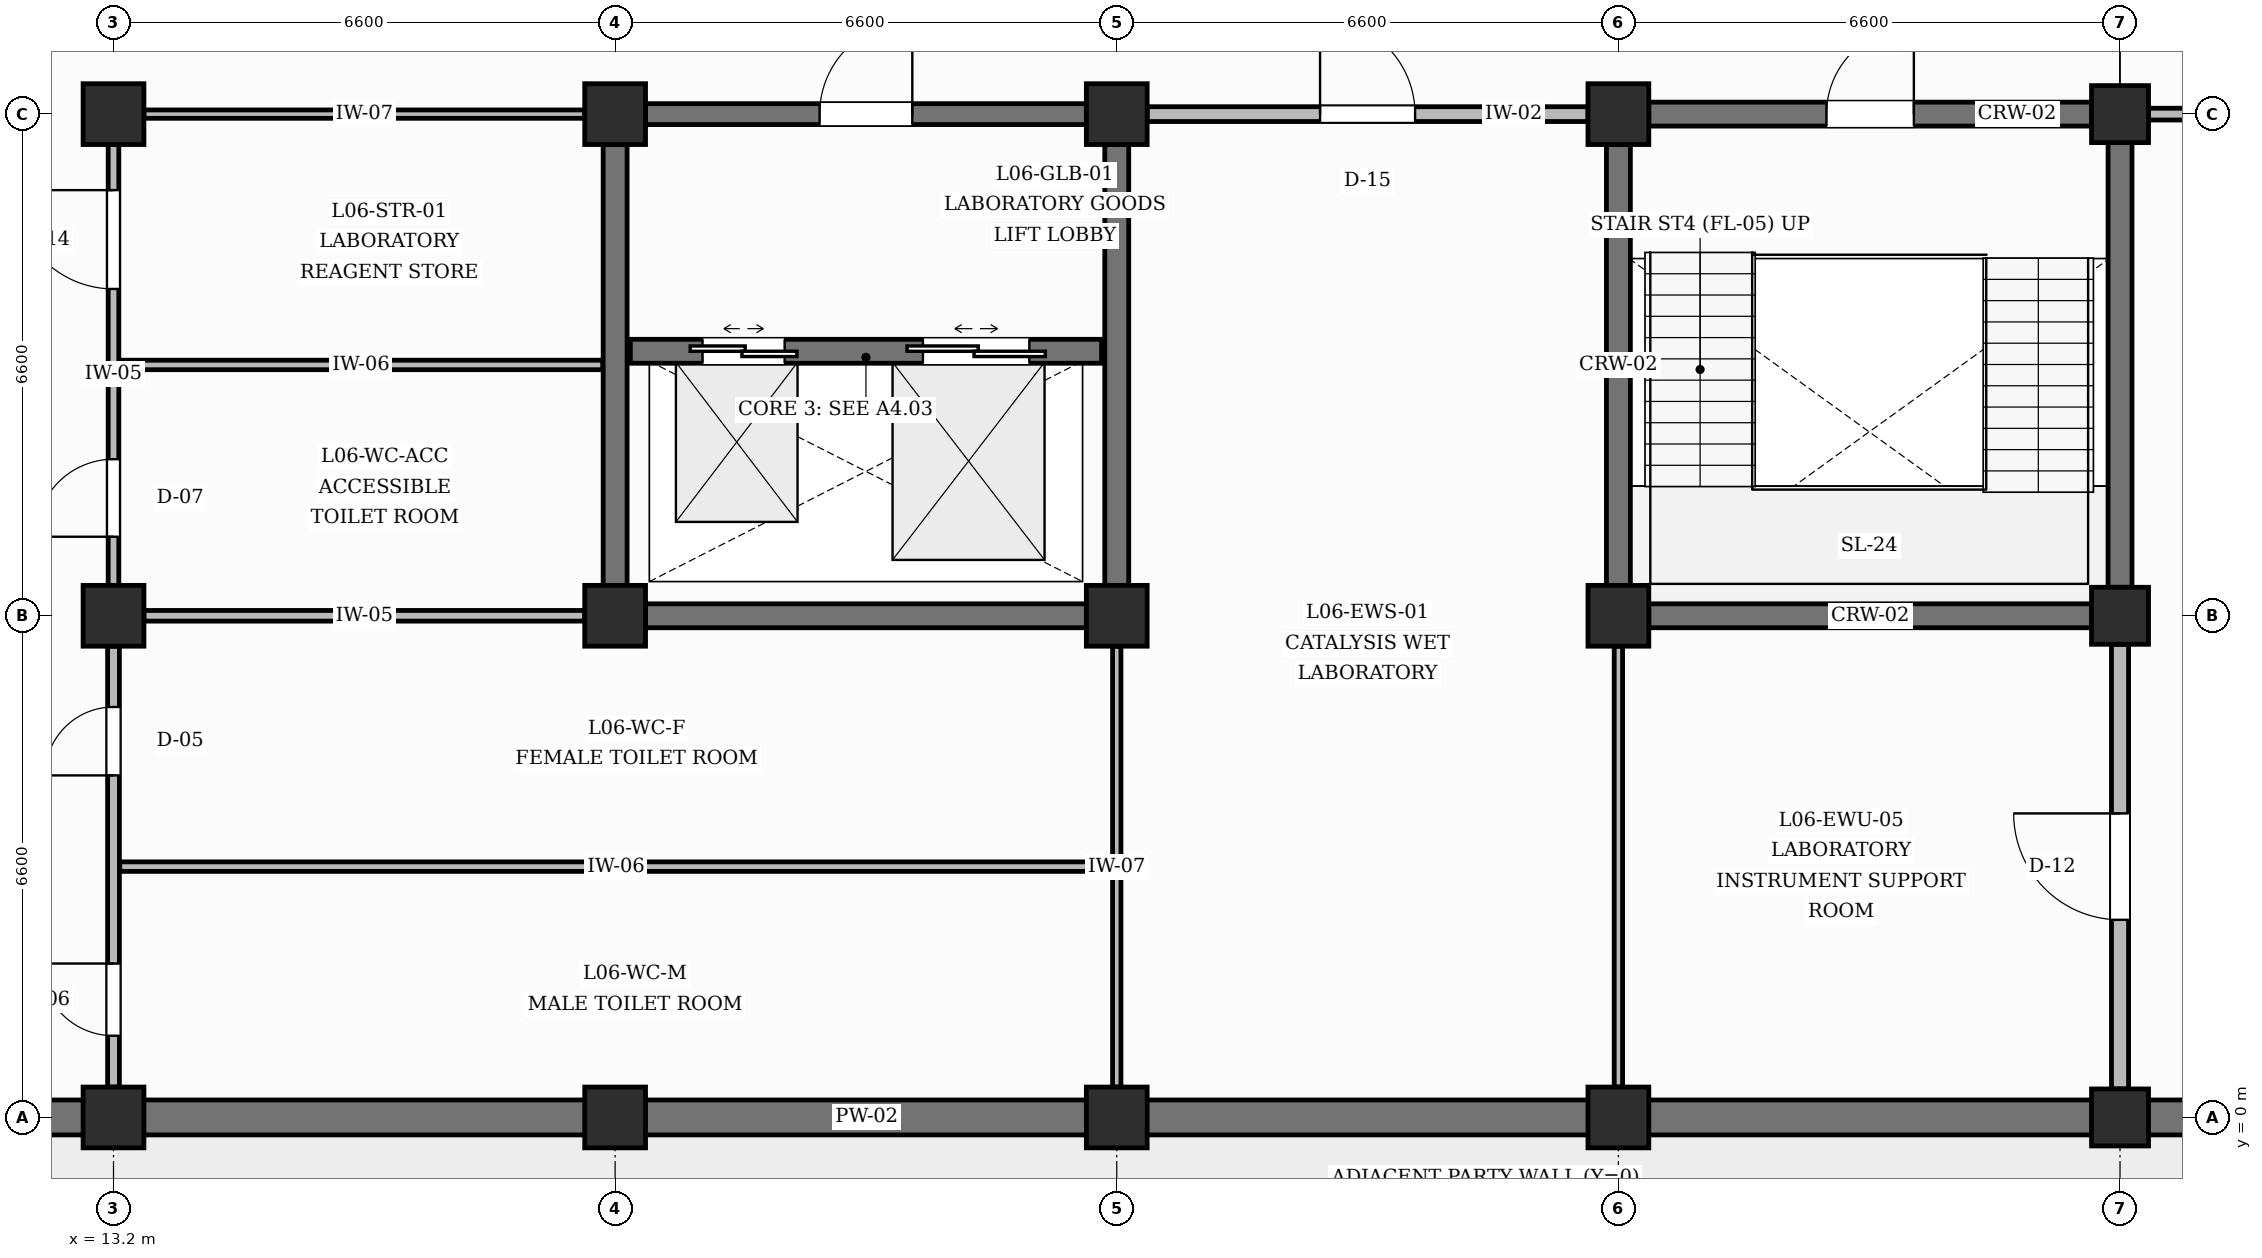
"""IFC4 building model, lengths in metres.
Left out: names, types, materials, properties, quantities, classifications, styles, units other than length and angle.
Written with IfcOpenShell. Run it as: python <this file> out.ifc"""

import sys

from ifc_helpers import new_model, si_unit, direction, frame, frame_2d, origin, origin_2d, place, context, subcontext, project, spatial, rectangle, extrude, element, fill, save


model = new_model("IFC4")
c1 = context("Model", 3, precision=1e-05, world=origin(), true_north=direction((0.0, 1.0)))
c2 = subcontext(c1, "Body", "Model", "MODEL_VIEW")
j1 = project(units=[si_unit("LENGTHUNIT", "METRE"), si_unit("PLANEANGLEUNIT", "RADIAN")], contexts=[c1])
p1 = place(None, origin())
s1 = spatial("IfcSite", under=j1, at=p1, CompositionType="ELEMENT")
p2 = place(p1, origin())
s2 = spatial("IfcBuilding", under=s1, at=p2, CompositionType="ELEMENT")
p3 = place(p2, frame((0.0, 0.0, 27.0)))
s3 = spatial("IfcBuildingStorey", under=s2, at=p3, CompositionType="ELEMENT", Elevation=27.0)
for number, where, z_axis, x_axis in (
    (1, (13.2, 0.0, 0.0), (0.0, 0.0, 1.0), (1.0, 0.0, 0.0)),
    (2, (13.2, 6.6, 0.0), (0.0, 0.0, 1.0), (1.0, 0.0, 0.0)),
    (3, (13.2, 13.2, 0.0), (0.0, 0.0, 1.0), (1.0, 0.0, 0.0)),
    (4, (19.8, 0.0, 0.0), (0.0, 0.0, 1.0), (1.0, 0.0, 0.0)),
    (5, (19.8, 6.6, 0.0), (0.0, 0.0, 1.0), (1.0, 0.0, 0.0)),
    (6, (19.8, 13.2, 0.0), (0.0, 0.0, 1.0), (1.0, 0.0, 0.0)),
    (7, (26.4, 0.0, 0.0), (0.0, 0.0, 1.0), (1.0, 0.0, 0.0)),
    (8, (26.4, 6.6, 0.0), (0.0, 0.0, 1.0), (1.0, 0.0, 0.0)),
    (9, (26.4, 13.2, 0.0), (0.0, 0.0, 1.0), (1.0, 0.0, 0.0)),
    (10, (33.0, 0.0, 0.0), (0.0, 0.0, 1.0), (1.0, 0.0, 0.0)),
    (11, (33.0, 6.6, 0.0), (0.0, 0.0, 1.0), (1.0, 0.0, 0.0)),
    (12, (33.0, 13.2, 0.0), (0.0, 0.0, 1.0), (1.0, 0.0, 0.0)),
):
    element("IfcColumn", number, at=place(p3, frame(where, z_axis=z_axis, x_axis=x_axis)), inside=s3, PredefinedType="COLUMN", context=c2, shape_type="SweptSolid", body=[
        extrude(rectangle(XDim=0.8, YDim=0.8, at=origin_2d()), origin(), (0.0, 0.0, 1.0), 4.2),
    ])
for number, where, z_axis, x_axis in (
    (13, (39.6, 0.0, 0.0), (0.0, 0.0, 1.0), (1.0, 0.0, 0.0)),
    (14, (39.6, 6.6, 0.0), (0.0, 0.0, 1.0), (1.0, 0.0, 0.0)),
    (15, (39.6, 13.2, 0.0), (0.0, 0.0, 1.0), (1.0, 0.0, 0.0)),
):
    element("IfcColumn", number, at=place(p3, frame(where, z_axis=z_axis, x_axis=x_axis)), inside=s3, PredefinedType="COLUMN", context=c2, shape_type="SweptSolid", body=[
        extrude(rectangle(XDim=0.75, YDim=0.75, at=origin_2d()), origin(), (0.0, 0.0, 1.0), 4.2),
    ])
p4 = place(p3, frame((7.0, 0.0, 0.0), z_axis=(0.0, 0.0, 1.0), x_axis=(1.0, 0.0, 0.0)))
e16 = element("IfcWall", 16, at=p4, inside=s3, PredefinedType="SOLIDWALL", context=c2, shape_type="SweptSolid", body=[
    extrude(rectangle(XDim=5.8, YDim=0.46, at=frame_2d((2.9, 0.0))), origin(), (0.0, 0.0, 1.0), 3.27),
])
p5 = place(p3, frame((13.6, 0.0, 0.0), z_axis=(0.0, 0.0, 1.0), x_axis=(1.0, 0.0, 0.0)))
e17 = element("IfcWall", 17, at=p5, inside=s3, PredefinedType="SOLIDWALL", context=c2, shape_type="SweptSolid", body=[
    extrude(rectangle(XDim=5.8, YDim=0.46, at=frame_2d((2.9, 0.0))), origin(), (0.0, 0.0, 1.0), 3.27),
])
for number, where, z_axis, x_axis in (
    (18, (20.2, 0.0, 0.0), (0.0, 0.0, 1.0), (1.0, 0.0, 0.0)),
    (19, (26.8, 0.0, 0.0), (0.0, 0.0, 1.0), (1.0, 0.0, 0.0)),
):
    element("IfcWall", number, at=place(p3, frame(where, z_axis=z_axis, x_axis=x_axis)), inside=s3, PredefinedType="SOLIDWALL", context=c2, shape_type="SweptSolid", body=[
        extrude(rectangle(XDim=5.8, YDim=0.46, at=frame_2d((2.9, 0.0))), origin(), (0.0, 0.0, 1.0), 3.27),
    ])
p6 = place(p3, frame((33.4, 0.0, 0.0), z_axis=(0.0, 0.0, 1.0), x_axis=(1.0, 0.0, 0.0)))
e20 = element("IfcWall", 20, at=p6, inside=s3, PredefinedType="SOLIDWALL", context=c2, shape_type="SweptSolid", body=[
    extrude(rectangle(XDim=5.825, YDim=0.46, at=frame_2d((2.913, 0.0))), origin(), (0.0, 0.0, 1.0), 3.27),
])
p7 = place(p3, frame((39.975, 0.0, 0.0), z_axis=(0.0, 0.0, 1.0), x_axis=(1.0, 0.0, 0.0)))
e21 = element("IfcWall", 21, at=p7, inside=s3, PredefinedType="SOLIDWALL", context=c2, shape_type="SweptSolid", body=[
    extrude(rectangle(XDim=5.85, YDim=0.46, at=frame_2d((2.925, 0.0))), origin(), (0.0, 0.0, 1.0), 3.27),
])
p8 = place(p3, frame((33.4, 6.6, 0.0), z_axis=(0.0, 0.0, 1.0), x_axis=(1.0, 0.0, 0.0)))
e22 = element("IfcWall", 22, at=p8, inside=s3, PredefinedType="SHEAR", context=c2, shape_type="SweptSolid", body=[
    extrude(rectangle(XDim=5.825, YDim=0.315, at=frame_2d((2.913, 0.0))), origin(), (0.0, 0.0, 1.0), 3.17),
])
p9 = place(p3, frame((33.4, 13.2, 0.0), z_axis=(0.0, 0.0, 1.0), x_axis=(1.0, 0.0, 0.0)))
e23 = element("IfcWall", 23, at=p9, inside=s3, PredefinedType="SHEAR", context=c2, shape_type="SweptSolid", body=[
    extrude(rectangle(XDim=5.825, YDim=0.315, at=frame_2d((2.913, 0.0))), origin(), (0.0, 0.0, 1.0), 3.17),
])
p10 = place(p9, frame((2.337, 0.0, 0.0)))
e24 = element("IfcOpeningElement", 24, at=p10, cuts=e23, PredefinedType="OPENING", context=c2, shape_type="SweptSolid", body=[
    extrude(rectangle(XDim=1.15, YDim=2.2, at=frame_2d((0.575, 1.1))), frame((0.0, 0.167, 0.0), z_axis=(0.0, -1.0, 0.0), x_axis=(1.0, 0.0, 0.0)), (0.0, 0.0, 1.0), 0.335),
])
p11 = place(p3, frame((33.0, 7.0, 0.0), z_axis=(0.0, 0.0, 1.0), x_axis=(0.0, 1.0, 0.0)))
e25 = element("IfcWall", 25, at=p11, inside=s3, PredefinedType="SHEAR", context=c2, shape_type="SweptSolid", body=[
    extrude(rectangle(XDim=5.8, YDim=0.315, at=frame_2d((2.9, 0.0))), origin(), (0.0, 0.0, 1.0), 3.17),
])
p12 = place(p3, frame((39.6, 6.975, 0.0), z_axis=(0.0, 0.0, 1.0), x_axis=(0.0, 1.0, 0.0)))
e26 = element("IfcWall", 26, at=p12, inside=s3, PredefinedType="SHEAR", context=c2, shape_type="SweptSolid", body=[
    extrude(rectangle(XDim=5.85, YDim=0.315, at=frame_2d((2.925, 0.0))), origin(), (0.0, 0.0, 1.0), 3.17),
])
for number, where, z_axis, x_axis in (
    (27, (20.2, 6.6, 0.0), (0.0, 0.0, 1.0), (1.0, 0.0, 0.0)),
    (28, (19.8, 7.0, 0.0), (0.0, 0.0, 1.0), (0.0, 1.0, 0.0)),
    (29, (26.4, 7.0, 0.0), (0.0, 0.0, 1.0), (0.0, 1.0, 0.0)),
):
    element("IfcWall", number, at=place(p3, frame(where, z_axis=z_axis, x_axis=x_axis)), inside=s3, PredefinedType="SHEAR", context=c2, shape_type="SweptSolid", body=[
        extrude(rectangle(XDim=5.8, YDim=0.315, at=frame_2d((2.9, 0.0))), origin(), (0.0, 0.0, 1.0), 3.17),
    ])
p13 = place(p3, frame((20.2, 13.2, 0.0), z_axis=(0.0, 0.0, 1.0), x_axis=(1.0, 0.0, 0.0)))
e30 = element("IfcWall", 30, at=p13, inside=s3, PredefinedType="SHEAR", context=c2, shape_type="SweptSolid", body=[
    extrude(rectangle(XDim=5.8, YDim=0.275, at=frame_2d((2.9, 0.0))), origin(), (0.0, 0.0, 1.0), 3.17),
])
p14 = place(p13, frame((2.29, 0.0, 0.0)))
e31 = element("IfcOpeningElement", 31, at=p14, cuts=e30, PredefinedType="OPENING", context=c2, shape_type="SweptSolid", body=[
    extrude(rectangle(XDim=1.22, YDim=2.15, at=frame_2d((0.61, 1.075))), frame((0.0, 0.147, 0.0), z_axis=(0.0, -1.0, 0.0), x_axis=(1.0, 0.0, 0.0)), (0.0, 0.0, 1.0), 0.295),
])
p15 = place(p3, frame((20.0, 10.08, 0.0), z_axis=(0.0, 0.0, 1.0), x_axis=(1.0, 0.0, 0.0)))
e32 = element("IfcWall", 32, at=p15, inside=s3, PredefinedType="SHEAR", context=c2, shape_type="SweptSolid", body=[
    extrude(rectangle(XDim=6.2, YDim=0.315, at=frame_2d((3.1, 0.0))), origin(), (0.0, 0.0, 1.0), 3.87),
])
p16 = place(p15, frame((0.95, 0.0, 0.0)))
e33 = element("IfcOpeningElement", 33, at=p16, cuts=e32, PredefinedType="OPENING", context=c2, shape_type="SweptSolid", body=[
    extrude(rectangle(XDim=1.08, YDim=2.15, at=frame_2d((0.54, 1.075))), frame((0.0, 0.167, 0.0), z_axis=(0.0, -1.0, 0.0), x_axis=(1.0, 0.0, 0.0)), (0.0, 0.0, 1.0), 0.335),
])
p17 = place(p15, frame((3.85, 0.0, 0.0)))
e34 = element("IfcOpeningElement", 34, at=p17, cuts=e32, PredefinedType="OPENING", context=c2, shape_type="SweptSolid", body=[
    extrude(rectangle(XDim=1.4, YDim=2.35, at=frame_2d((0.7, 1.175))), frame((0.0, 0.167, 0.0), z_axis=(0.0, -1.0, 0.0), x_axis=(1.0, 0.0, 0.0)), (0.0, 0.0, 1.0), 0.335),
])
p18 = place(p3, frame((13.2, 0.4, 0.0), z_axis=(0.0, 0.0, 1.0), x_axis=(0.0, 1.0, 0.0)))
e35 = element("IfcWall", 35, at=p18, inside=s3, PredefinedType="PARTITIONING", context=c2, shape_type="SweptSolid", body=[
    extrude(rectangle(XDim=5.8, YDim=0.155, at=frame_2d((2.9, 0.0))), origin(), (0.0, 0.0, 1.0), 3.17),
])
p19 = place(p18, frame((0.675, 0.0, 0.0)))
e36 = element("IfcOpeningElement", 36, at=p19, cuts=e35, PredefinedType="OPENING", context=c2, shape_type="SweptSolid", body=[
    extrude(rectangle(XDim=0.95, YDim=2.1, at=frame_2d((0.475, 1.05))), frame((0.0, 0.087, 0.0), z_axis=(0.0, -1.0, 0.0), x_axis=(1.0, 0.0, 0.0)), (0.0, 0.0, 1.0), 0.175),
])
p20 = place(p18, frame((4.1, 0.0, 0.0)))
e37 = element("IfcOpeningElement", 37, at=p20, cuts=e35, PredefinedType="OPENING", context=c2, shape_type="SweptSolid", body=[
    extrude(rectangle(XDim=0.9, YDim=2.1, at=frame_2d((0.45, 1.05))), frame((0.0, 0.087, 0.0), z_axis=(0.0, -1.0, 0.0), x_axis=(1.0, 0.0, 0.0)), (0.0, 0.0, 1.0), 0.175),
])
p21 = place(p3, frame((26.4, 0.4, 0.0), z_axis=(0.0, 0.0, 1.0), x_axis=(0.0, 1.0, 0.0)))
e38 = element("IfcWall", 38, at=p21, inside=s3, PredefinedType="PARTITIONING", context=c2, shape_type="SweptSolid", body=[
    extrude(rectangle(XDim=5.8, YDim=0.11, at=frame_2d((2.9, 0.0))), origin(), (0.0, 0.0, 1.0), 3.17),
])
p22 = place(p3, frame((13.6, 6.6, 0.0), z_axis=(0.0, 0.0, 1.0), x_axis=(1.0, 0.0, 0.0)))
e39 = element("IfcWall", 39, at=p22, inside=s3, PredefinedType="PARTITIONING", context=c2, shape_type="SweptSolid", body=[
    extrude(rectangle(XDim=5.8, YDim=0.14, at=frame_2d((2.9, 0.0))), origin(), (0.0, 0.0, 1.0), 3.17),
])
p23 = place(p3, frame((13.2, 7.0, 0.0), z_axis=(0.0, 0.0, 1.0), x_axis=(0.0, 1.0, 0.0)))
e40 = element("IfcWall", 40, at=p23, inside=s3, PredefinedType="PARTITIONING", context=c2, shape_type="SweptSolid", body=[
    extrude(rectangle(XDim=5.8, YDim=0.14, at=frame_2d((2.9, 0.0))), origin(), (0.0, 0.0, 1.0), 3.17),
])
p24 = place(p23, frame((0.64, 0.0, 0.0)))
e41 = element("IfcOpeningElement", 41, at=p24, cuts=e40, PredefinedType="OPENING", context=c2, shape_type="SweptSolid", body=[
    extrude(rectangle(XDim=1.02, YDim=2.15, at=frame_2d((0.51, 1.075))), frame((0.0, 0.08, 0.0), z_axis=(0.0, -1.0, 0.0), x_axis=(1.0, 0.0, 0.0)), (0.0, 0.0, 1.0), 0.16),
])
p25 = place(p23, frame((3.9, 0.0, 0.0)))
e42 = element("IfcOpeningElement", 42, at=p25, cuts=e40, PredefinedType="OPENING", context=c2, shape_type="SweptSolid", body=[
    extrude(rectangle(XDim=1.3, YDim=2.3, at=frame_2d((0.65, 1.15))), frame((0.0, 0.08, 0.0), z_axis=(0.0, -1.0, 0.0), x_axis=(1.0, 0.0, 0.0)), (0.0, 0.0, 1.0), 0.16),
])
p26 = place(p3, frame((13.6, 13.2, 0.0), z_axis=(0.0, 0.0, 1.0), x_axis=(1.0, 0.0, 0.0)))
e43 = element("IfcWall", 43, at=p26, inside=s3, PredefinedType="PARTITIONING", context=c2, shape_type="SweptSolid", body=[
    extrude(rectangle(XDim=5.8, YDim=0.11, at=frame_2d((2.9, 0.0))), origin(), (0.0, 0.0, 1.0), 3.17),
])
p27 = place(p3, frame((33.0, 0.4, 0.0), z_axis=(0.0, 0.0, 1.0), x_axis=(0.0, 1.0, 0.0)))
e44 = element("IfcWall", 44, at=p27, inside=s3, PredefinedType="PARTITIONING", context=c2, shape_type="SweptSolid", body=[
    extrude(rectangle(XDim=5.8, YDim=0.11, at=frame_2d((2.9, 0.0))), origin(), (0.0, 0.0, 1.0), 3.17),
])
p28 = place(p3, frame((26.8, 13.2, 0.0), z_axis=(0.0, 0.0, 1.0), x_axis=(1.0, 0.0, 0.0)))
e45 = element("IfcWall", 45, at=p28, inside=s3, PredefinedType="PARTITIONING", context=c2, shape_type="SweptSolid", body=[
    extrude(rectangle(XDim=5.8, YDim=0.195, at=frame_2d((2.9, 0.0))), origin(), (0.0, 0.0, 1.0), 3.17),
])
p29 = place(p28, frame((2.275, 0.0, 0.0)))
e46 = element("IfcOpeningElement", 46, at=p29, cuts=e45, PredefinedType="OPENING", context=c2, shape_type="SweptSolid", body=[
    extrude(rectangle(XDim=1.25, YDim=2.25, at=frame_2d((0.625, 1.125))), frame((0.0, 0.107, 0.0), z_axis=(0.0, -1.0, 0.0), x_axis=(1.0, 0.0, 0.0)), (0.0, 0.0, 1.0), 0.215),
])
p30 = place(p3, frame((39.6, 0.375, 0.0), z_axis=(0.0, 0.0, 1.0), x_axis=(0.0, 1.0, 0.0)))
e47 = element("IfcWall", 47, at=p30, inside=s3, PredefinedType="PARTITIONING", context=c2, shape_type="SweptSolid", body=[
    extrude(rectangle(XDim=5.85, YDim=0.225, at=frame_2d((2.925, 0.0))), origin(), (0.0, 0.0, 1.0), 3.17),
])
p31 = place(p30, frame((2.225, 0.0, 0.0)))
e48 = element("IfcOpeningElement", 48, at=p31, cuts=e47, PredefinedType="OPENING", context=c2, shape_type="SweptSolid", body=[
    extrude(rectangle(XDim=1.4, YDim=2.25, at=frame_2d((0.7, 1.125))), frame((0.0, 0.123, 0.0), z_axis=(0.0, -1.0, 0.0), x_axis=(1.0, 0.0, 0.0)), (0.0, 0.0, 1.0), 0.245),
])
p32 = place(p3, frame((39.975, 13.2, 0.0), z_axis=(0.0, 0.0, 1.0), x_axis=(1.0, 0.0, 0.0)))
e49 = element("IfcWall", 49, at=p32, inside=s3, PredefinedType="PARTITIONING", context=c2, shape_type="SweptSolid", body=[
    extrude(rectangle(XDim=5.85, YDim=0.155, at=frame_2d((2.925, 0.0))), origin(), (0.0, 0.0, 1.0), 3.17),
])
p33 = place(p32, frame((2.2, 0.0, 0.0)))
e50 = element("IfcOpeningElement", 50, at=p33, cuts=e49, PredefinedType="OPENING", context=c2, shape_type="SweptSolid", body=[
    extrude(rectangle(XDim=1.45, YDim=2.25, at=frame_2d((0.725, 1.125))), frame((0.0, 0.087, 0.0), z_axis=(0.0, -1.0, 0.0), x_axis=(1.0, 0.0, 0.0)), (0.0, 0.0, 1.0), 0.175),
])
p34 = place(p3, frame((13.282, 3.3, 0.0), z_axis=(0.0, 0.0, 1.0), x_axis=(1.0, 0.0, 0.0)))
e51 = element("IfcWall", 51, at=p34, inside=s3, PredefinedType="PARTITIONING", context=c2, shape_type="SweptSolid", body=[
    extrude(rectangle(XDim=13.058, YDim=0.125, at=frame_2d((6.529, 0.0))), origin(), (0.0, 0.0, 1.0), 3.87),
])
p35 = place(p3, frame((13.275, 9.9, 0.0), z_axis=(0.0, 0.0, 1.0), x_axis=(1.0, 0.0, 0.0)))
e52 = element("IfcWall", 52, at=p35, inside=s3, PredefinedType="PARTITIONING", context=c2, shape_type="SweptSolid", body=[
    extrude(rectangle(XDim=6.363, YDim=0.125, at=frame_2d((3.181, 0.0))), origin(), (0.0, 0.0, 1.0), 3.87),
])
p36 = place(p10, origin())
e53 = element("IfcDoor", 53, at=p36, inside=s3, OperationType="SINGLE_SWING_RIGHT", PredefinedType="DOOR", context=c2, shape_type="SweptSolid", body=[
    extrude(rectangle(XDim=1.15, YDim=2.2, at=frame_2d((0.575, 1.1))), frame((0.0, 0.025, 0.0), z_axis=(0.0, -1.0, 0.0), x_axis=(1.0, 0.0, 0.0)), (0.0, 0.0, 1.0), 0.05),
])
fill(e24, e53)
p37 = place(p16, origin())
e54 = element("IfcDoor", 54, at=p37, inside=s3, OperationType="DOUBLE_DOOR_SLIDING", PredefinedType="USERDEFINED", context=c2, shape_type="SweptSolid", body=[
    extrude(rectangle(XDim=1.08, YDim=2.15, at=frame_2d((0.54, 1.075))), frame((0.0, 0.025, 0.0), z_axis=(0.0, -1.0, 0.0), x_axis=(1.0, 0.0, 0.0)), (0.0, 0.0, 1.0), 0.05),
])
fill(e33, e54)
p38 = place(p17, origin())
e55 = element("IfcDoor", 55, at=p38, inside=s3, OperationType="DOUBLE_DOOR_SLIDING", PredefinedType="USERDEFINED", context=c2, shape_type="SweptSolid", body=[
    extrude(rectangle(XDim=1.4, YDim=2.35, at=frame_2d((0.7, 1.175))), frame((0.0, 0.025, 0.0), z_axis=(0.0, -1.0, 0.0), x_axis=(1.0, 0.0, 0.0)), (0.0, 0.0, 1.0), 0.05),
])
fill(e34, e55)
p39 = place(p14, origin())
e56 = element("IfcDoor", 56, at=p39, inside=s3, OperationType="SINGLE_SWING_RIGHT", PredefinedType="DOOR", context=c2, shape_type="SweptSolid", body=[
    extrude(rectangle(XDim=1.22, YDim=2.15, at=frame_2d((0.61, 1.075))), frame((0.0, 0.025, 0.0), z_axis=(0.0, -1.0, 0.0), x_axis=(1.0, 0.0, 0.0)), (0.0, 0.0, 1.0), 0.05),
])
fill(e31, e56)
p40 = place(p19, origin())
e57 = element("IfcDoor", 57, at=p40, inside=s3, OperationType="SINGLE_SWING_RIGHT", PredefinedType="DOOR", context=c2, shape_type="SweptSolid", body=[
    extrude(rectangle(XDim=0.95, YDim=2.1, at=frame_2d((0.475, 1.05))), frame((0.0, 0.025, 0.0), z_axis=(0.0, -1.0, 0.0), x_axis=(1.0, 0.0, 0.0)), (0.0, 0.0, 1.0), 0.05),
])
fill(e36, e57)
p41 = place(p20, origin())
e58 = element("IfcDoor", 58, at=p41, inside=s3, OperationType="SINGLE_SWING_LEFT", PredefinedType="DOOR", context=c2, shape_type="SweptSolid", body=[
    extrude(rectangle(XDim=0.9, YDim=2.1, at=frame_2d((0.45, 1.05))), frame((0.0, 0.025, 0.0), z_axis=(0.0, -1.0, 0.0), x_axis=(1.0, 0.0, 0.0)), (0.0, 0.0, 1.0), 0.05),
])
fill(e37, e58)
p42 = place(p24, origin())
e59 = element("IfcDoor", 59, at=p42, inside=s3, OperationType="SINGLE_SWING_LEFT", PredefinedType="DOOR", context=c2, shape_type="SweptSolid", body=[
    extrude(rectangle(XDim=1.02, YDim=2.15, at=frame_2d((0.51, 1.075))), frame((0.0, 0.025, 0.0), z_axis=(0.0, -1.0, 0.0), x_axis=(1.0, 0.0, 0.0)), (0.0, 0.0, 1.0), 0.05),
])
fill(e41, e59)
p43 = place(p25, origin())
e60 = element("IfcDoor", 60, at=p43, inside=s3, OperationType="SINGLE_SWING_RIGHT", PredefinedType="DOOR", context=c2, shape_type="SweptSolid", body=[
    extrude(rectangle(XDim=1.3, YDim=2.3, at=frame_2d((0.65, 1.15))), frame((0.0, 0.025, 0.0), z_axis=(0.0, -1.0, 0.0), x_axis=(1.0, 0.0, 0.0)), (0.0, 0.0, 1.0), 0.05),
])
fill(e42, e60)
p44 = place(p29, origin())
e61 = element("IfcDoor", 61, at=p44, inside=s3, OperationType="SINGLE_SWING_LEFT", PredefinedType="DOOR", context=c2, shape_type="SweptSolid", body=[
    extrude(rectangle(XDim=1.25, YDim=2.25, at=frame_2d((0.625, 1.125))), frame((0.0, 0.025, 0.0), z_axis=(0.0, -1.0, 0.0), x_axis=(1.0, 0.0, 0.0)), (0.0, 0.0, 1.0), 0.05),
])
fill(e46, e61)
p45 = place(p31, origin())
e62 = element("IfcDoor", 62, at=p45, inside=s3, OperationType="SINGLE_SWING_RIGHT", PredefinedType="DOOR", context=c2, shape_type="SweptSolid", body=[
    extrude(rectangle(XDim=1.4, YDim=2.25, at=frame_2d((0.7, 1.125))), frame((0.0, 0.025, 0.0), z_axis=(0.0, -1.0, 0.0), x_axis=(1.0, 0.0, 0.0)), (0.0, 0.0, 1.0), 0.05),
])
fill(e48, e62)
save(model, sys.argv[1])
